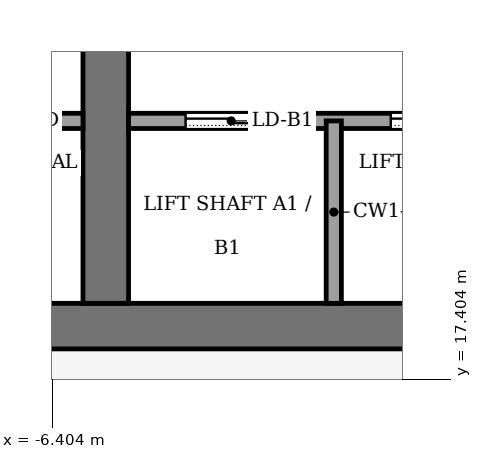
"""IFC4 building model, lengths in metres.
Left out: names, types, materials, properties, quantities, classifications, styles, units other than length and angle.
Written with IfcOpenShell. Run it as: python <this file> out.ifc"""

import sys

from ifc_helpers import new_model, si_unit, direction, frame, frame_2d, origin, place, context, subcontext, project, spatial, rectangle, extrude, element, fill, save


model = new_model("IFC4")
c1 = context("Model", 3, precision=1e-05, world=origin(), true_north=direction((0.0, 1.0)))
c2 = subcontext(c1, "Body", "Model", "MODEL_VIEW")
j1 = project(units=[si_unit("LENGTHUNIT", "METRE"), si_unit("PLANEANGLEUNIT", "RADIAN")], contexts=[c1])
p1 = place(None, origin())
s1 = spatial("IfcSite", under=j1, at=p1, CompositionType="ELEMENT")
p2 = place(p1, origin())
s2 = spatial("IfcBuilding", under=s1, at=p2, CompositionType="ELEMENT")
p3 = place(p2, frame((0.0, 0.0, 330.0)))
s3 = spatial("IfcBuildingStorey", under=s2, at=p3, CompositionType="ELEMENT", Elevation=330.0)
p4 = place(p3, frame((-13.2, 18.1, -0.13), z_axis=(0.0, 0.0, 1.0), x_axis=(1.0, 0.0, 0.0)))
e1 = element("IfcWall", 1, at=p4, inside=s3, PredefinedType="SHEAR", context=c2, shape_type="SweptSolid", body=[
    extrude(rectangle(XDim=26.4, YDim=0.6, at=frame_2d((13.2, 0.0))), origin(), (0.0, 0.0, 1.0), 3.95),
])
p5 = place(p3, frame((-5.7, 18.4, -0.13), z_axis=(0.0, 0.0, 1.0), x_axis=(0.0, 1.0, 0.0)))
e2 = element("IfcWall", 2, at=p5, inside=s3, PredefinedType="SHEAR", context=c2, shape_type="SweptSolid", body=[
    extrude(rectangle(XDim=19.2, YDim=0.6, at=frame_2d((9.6, 0.0))), origin(), (0.0, 0.0, 1.0), 3.95),
])
p6 = place(p5, frame((8.35, 0.0, 0.13)))
e3 = element("IfcOpeningElement", 3, at=p6, cuts=e2, PredefinedType="OPENING", context=c2, shape_type="SweptSolid", body=[
    extrude(rectangle(XDim=0.9, YDim=2.1, at=frame_2d((0.45, 1.05))), frame((0.0, 0.31, 0.0), z_axis=(0.0, -1.0, 0.0), x_axis=(1.0, 0.0, 0.0)), (0.0, 0.0, 1.0), 0.62),
])
p7 = place(p3, frame((-12.6, 20.8, 0.0), z_axis=(0.0, 0.0, 1.0), x_axis=(1.0, 0.0, 0.0)))
e4 = element("IfcWall", 4, at=p7, inside=s3, PredefinedType="PARTITIONING", context=c2, shape_type="SweptSolid", body=[
    extrude(rectangle(XDim=6.6, YDim=0.2, at=frame_2d((3.3, 0.0))), origin(), (0.0, 0.0, 1.0), 3.82),
])
p8 = place(p7, frame((1.81, 0.0, 0.0)))
e5 = element("IfcOpeningElement", 5, at=p8, cuts=e4, PredefinedType="OPENING", context=c2, shape_type="SweptSolid", body=[
    extrude(rectangle(XDim=1.0, YDim=2.1, at=frame_2d((0.5, 1.05))), frame((0.0, 0.11, 0.0), z_axis=(0.0, -1.0, 0.0), x_axis=(1.0, 0.0, 0.0)), (0.0, 0.0, 1.0), 0.22),
])
p9 = place(p7, frame((5.11, 0.0, 0.0)))
e6 = element("IfcOpeningElement", 6, at=p9, cuts=e4, PredefinedType="OPENING", context=c2, shape_type="SweptSolid", body=[
    extrude(rectangle(XDim=1.0, YDim=2.1, at=frame_2d((0.5, 1.05))), frame((0.0, 0.11, 0.0), z_axis=(0.0, -1.0, 0.0), x_axis=(1.0, 0.0, 0.0)), (0.0, 0.0, 1.0), 0.22),
])
p10 = place(p3, frame((-5.4, 20.8, 0.0), z_axis=(0.0, 0.0, 1.0), x_axis=(1.0, 0.0, 0.0)))
e7 = element("IfcWall", 7, at=p10, inside=s3, PredefinedType="PARTITIONING", context=c2, shape_type="SweptSolid", body=[
    extrude(rectangle(XDim=10.8, YDim=0.2, at=frame_2d((5.4, 0.0))), origin(), (0.0, 0.0, 1.0), 3.82),
])
p11 = place(p10, frame((0.75, 0.0, 0.0)))
e8 = element("IfcOpeningElement", 8, at=p11, cuts=e7, PredefinedType="OPENING", context=c2, shape_type="SweptSolid", body=[
    extrude(rectangle(XDim=1.2, YDim=2.2, at=frame_2d((0.6, 1.1))), frame((0.0, 0.11, 0.0), z_axis=(0.0, -1.0, 0.0), x_axis=(1.0, 0.0, 0.0)), (0.0, 0.0, 1.0), 0.22),
])
p12 = place(p10, frame((3.45, 0.0, 0.0)))
e9 = element("IfcOpeningElement", 9, at=p12, cuts=e7, PredefinedType="OPENING", context=c2, shape_type="SweptSolid", body=[
    extrude(rectangle(XDim=1.2, YDim=2.2, at=frame_2d((0.6, 1.1))), frame((0.0, 0.11, 0.0), z_axis=(0.0, -1.0, 0.0), x_axis=(1.0, 0.0, 0.0)), (0.0, 0.0, 1.0), 0.22),
])
p13 = place(p10, frame((6.15, 0.0, 0.0)))
e10 = element("IfcOpeningElement", 10, at=p13, cuts=e7, PredefinedType="OPENING", context=c2, shape_type="SweptSolid", body=[
    extrude(rectangle(XDim=1.2, YDim=2.2, at=frame_2d((0.6, 1.1))), frame((0.0, 0.11, 0.0), z_axis=(0.0, -1.0, 0.0), x_axis=(1.0, 0.0, 0.0)), (0.0, 0.0, 1.0), 0.22),
])
p14 = place(p10, frame((8.85, 0.0, 0.0)))
e11 = element("IfcOpeningElement", 11, at=p14, cuts=e7, PredefinedType="OPENING", context=c2, shape_type="SweptSolid", body=[
    extrude(rectangle(XDim=1.2, YDim=2.2, at=frame_2d((0.6, 1.1))), frame((0.0, 0.11, 0.0), z_axis=(0.0, -1.0, 0.0), x_axis=(1.0, 0.0, 0.0)), (0.0, 0.0, 1.0), 0.22),
])
p15 = place(p3, frame((-2.7, 18.4, 0.0), z_axis=(0.0, 0.0, 1.0), x_axis=(0.0, 1.0, 0.0)))
e12 = element("IfcWall", 12, at=p15, inside=s3, PredefinedType="PARTITIONING", context=c2, shape_type="SweptSolid", body=[
    extrude(rectangle(XDim=2.4, YDim=0.2, at=frame_2d((1.2, 0.0))), origin(), (0.0, 0.0, 1.0), 3.82),
])
p16 = place(p11, origin())
e13 = element("IfcDoor", 13, at=p16, inside=s3, OperationType="SLIDING_TO_LEFT", PredefinedType="DOOR", context=c2, shape_type="SweptSolid", body=[
    extrude(rectangle(XDim=1.2, YDim=2.2, at=frame_2d((0.6, 1.1))), frame((0.0, 0.025, 0.0), z_axis=(0.0, -1.0, 0.0), x_axis=(1.0, 0.0, 0.0)), (0.0, 0.0, 1.0), 0.05),
])
fill(e8, e13)
p17 = place(p12, origin())
e14 = element("IfcDoor", 14, at=p17, inside=s3, OperationType="SLIDING_TO_LEFT", PredefinedType="DOOR", context=c2, shape_type="SweptSolid", body=[
    extrude(rectangle(XDim=1.2, YDim=2.2, at=frame_2d((0.6, 1.1))), frame((0.0, 0.025, 0.0), z_axis=(0.0, -1.0, 0.0), x_axis=(1.0, 0.0, 0.0)), (0.0, 0.0, 1.0), 0.05),
])
fill(e9, e14)
save(model, sys.argv[1])
